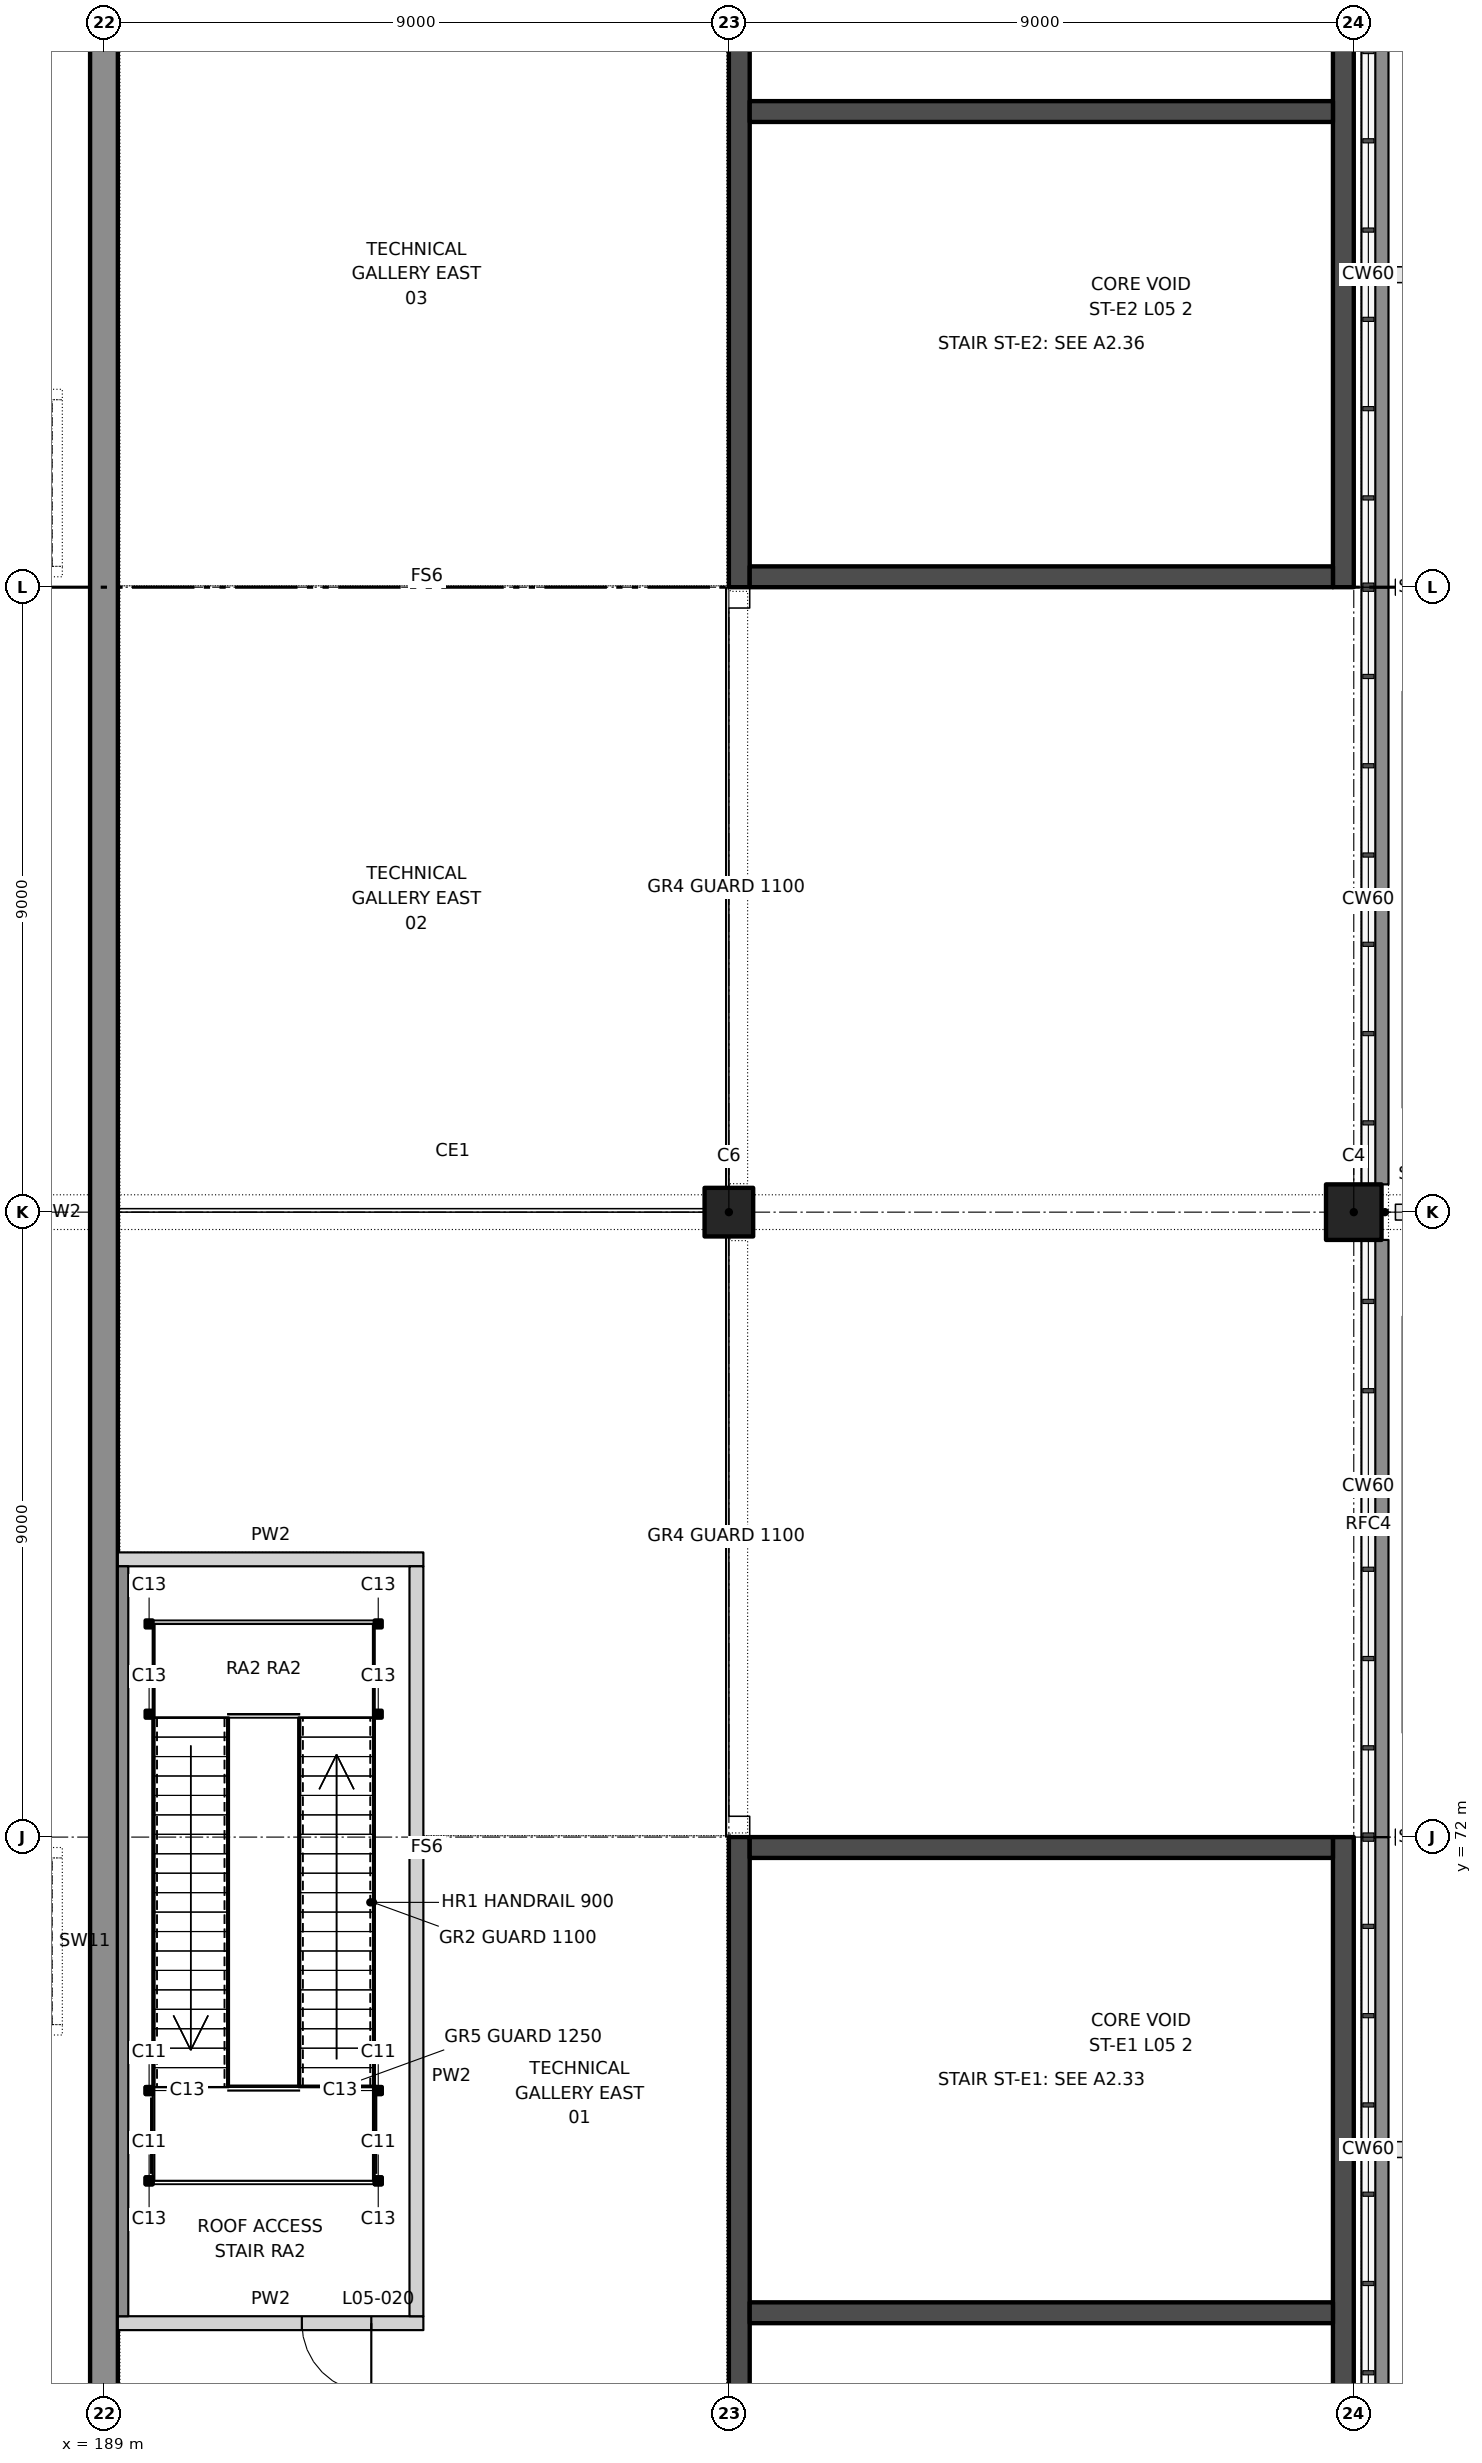
"""IFC4 building model, lengths in metres.
Left out: names, types, materials, properties, quantities, classifications, styles, units other than length and angle.
Written with IfcOpenShell. Run it as: python <this file> out.ifc"""

import sys

from ifc_helpers import new_model, si_unit, direction, frame, frame_2d, origin, origin_2d, place, context, subcontext, project, spatial, rectangle, hollow_rectangle, extrude, element, fill, save


model = new_model("IFC4")
c1 = context("Model", 3, precision=1e-05, world=origin(), true_north=direction((0.0, 1.0)))
c2 = subcontext(c1, "Body", "Model", "MODEL_VIEW")
j1 = project(units=[si_unit("LENGTHUNIT", "METRE"), si_unit("PLANEANGLEUNIT", "RADIAN")], contexts=[c1])
p1 = place(None, origin())
s1 = spatial("IfcSite", under=j1, at=p1, CompositionType="ELEMENT")
p2 = place(p1, origin())
s2 = spatial("IfcBuilding", under=s1, at=p2, CompositionType="ELEMENT")
p3 = place(p2, frame((0.0, 0.0, 33.5)))
s3 = spatial("IfcBuildingStorey", under=s2, at=p3, CompositionType="ELEMENT", Elevation=33.5)
p4 = place(p3, frame((207.0, 81.0, 0.0), z_axis=(0.0, 0.0, 1.0), x_axis=(1.0, 0.0, 0.0)))
e1 = element("IfcColumn", 1, at=p4, inside=s3, PredefinedType="COLUMN", context=c2, shape_type="SweptSolid", body=[
    extrude(rectangle(XDim=0.8, YDim=0.8, at=origin_2d()), origin(), (0.0, 0.0, 1.0), 4.0),
])
p5 = place(p3, frame((198.0, 81.0, 0.0), z_axis=(0.0, 0.0, 1.0), x_axis=(1.0, 0.0, 0.0)))
e2 = element("IfcColumn", 2, at=p5, inside=s3, PredefinedType="COLUMN", context=c2, shape_type="SweptSolid", body=[
    extrude(rectangle(XDim=0.7, YDim=0.7, at=origin_2d()), origin(), (0.0, 0.0, 1.0), 4.0),
])
p6 = place(p3, frame((189.0, 63.0, 0.0), z_axis=(0.0, 0.0, 1.0), x_axis=(0.0, 1.0, 0.0)))
e3 = element("IfcWall", 3, at=p6, inside=s3, PredefinedType="SOLIDWALL", context=c2, shape_type="SweptSolid", body=[
    extrude(rectangle(XDim=36.0, YDim=0.4, at=frame_2d((18.0, 0.0))), origin(), (0.0, 0.0, 1.0), 4.0),
])
p7 = place(p2, frame((0.0, 0.0, 28.0)))
s4 = spatial("IfcBuildingStorey", under=s2, at=p7, CompositionType="ELEMENT", Elevation=28.0)
p8 = place(p7, frame((198.35, 81.0, 0.0), z_axis=(0.0, 0.0, 1.0), x_axis=(1.0, 0.0, 0.0)))
e4 = element("IfcWall", 4, at=p8, inside=s4, PredefinedType="PARTITIONING", context=c2, shape_type="SweptSolid", body=[
    extrude(rectangle(XDim=8.25, YDim=0.15, at=frame_2d((4.125, 0.0))), origin(), (0.0, 0.0, 1.0), 9.5),
])
p9 = place(p3, frame((189.2, 65.0, 0.0), z_axis=(0.0, 0.0, 1.0), x_axis=(1.0, 0.0, 0.0)))
e5 = element("IfcWall", 5, at=p9, inside=s3, PredefinedType="PARTITIONING", context=c2, shape_type="SweptSolid", body=[
    extrude(rectangle(XDim=4.4, YDim=0.2, at=frame_2d((2.2, 0.0))), origin(), (0.0, 0.0, 1.0), 12.85),
])
p10 = place(p9, frame((2.65, 0.0, 0.0)))
e6 = element("IfcOpeningElement", 6, at=p10, cuts=e5, PredefinedType="OPENING", context=c2, shape_type="SweptSolid", body=[
    extrude(rectangle(XDim=1.0, YDim=2.1, at=frame_2d((0.5, 1.05))), frame((0.0, 0.11, 0.0), z_axis=(0.0, -1.0, 0.0), x_axis=(1.0, 0.0, 0.0)), (0.0, 0.0, 1.0), 0.22),
])
p11 = place(p3, frame((189.2, 76.0, 0.0), z_axis=(0.0, 0.0, 1.0), x_axis=(1.0, 0.0, 0.0)))
e7 = element("IfcWall", 7, at=p11, inside=s3, PredefinedType="PARTITIONING", context=c2, shape_type="SweptSolid", body=[
    extrude(rectangle(XDim=4.4, YDim=0.2, at=frame_2d((2.2, 0.0))), origin(), (0.0, 0.0, 1.0), 12.85),
])
p12 = place(p3, frame((193.5, 65.1, 0.0), z_axis=(0.0, 0.0, 1.0), x_axis=(0.0, 1.0, 0.0)))
e8 = element("IfcWall", 8, at=p12, inside=s3, PredefinedType="PARTITIONING", context=c2, shape_type="SweptSolid", body=[
    extrude(rectangle(XDim=6.9, YDim=0.2, at=frame_2d((3.45, 0.0))), origin(), (0.0, 0.0, 1.0), 12.85),
])
p13 = place(p3, frame((193.5, 72.0, 0.0), z_axis=(0.0, 0.0, 1.0), x_axis=(0.0, 1.0, 0.0)))
e9 = element("IfcWall", 9, at=p13, inside=s3, PredefinedType="PARTITIONING", context=c2, shape_type="SweptSolid", body=[
    extrude(rectangle(XDim=3.9, YDim=0.2, at=frame_2d((1.95, 0.0))), origin(), (0.0, 0.0, 1.0), 12.85),
])
p14 = place(p3, frame((207.325, 63.0, 0.0), z_axis=(0.0, 0.0, 1.0), x_axis=(0.0, 1.0, 0.0)))
e10 = element("IfcWall", 10, at=p14, inside=s3, PredefinedType="SOLIDWALL", context=c2, shape_type="SweptSolid", body=[
    extrude(rectangle(XDim=9.0, YDim=0.35, at=frame_2d((4.5, 0.0))), origin(), (0.0, 0.0, 1.0), 4.0),
])
for number, where, z_axis, x_axis in (
    (11, (207.35, 72.0, 0.0), (0.0, 0.0, 1.0), (0.0, 1.0, 0.0)),
    (12, (207.35, 81.4, 0.0), (0.0, 0.0, 1.0), (0.0, 1.0, 0.0)),
):
    element("IfcWall", number, at=place(p3, frame(where, z_axis=z_axis, x_axis=x_axis)), inside=s3, PredefinedType="SOLIDWALL", context=c2, shape_type="SweptSolid", body=[
        extrude(rectangle(XDim=8.6, YDim=0.3, at=frame_2d((4.3, 0.0))), origin(), (0.0, 0.0, 1.0), 4.0),
    ])
p15 = place(p3, frame((207.325, 90.0, 0.0), z_axis=(0.0, 0.0, 1.0), x_axis=(0.0, 1.0, 0.0)))
e13 = element("IfcWall", 13, at=p15, inside=s3, PredefinedType="SOLIDWALL", context=c2, shape_type="SweptSolid", body=[
    extrude(rectangle(XDim=9.0, YDim=0.35, at=frame_2d((4.5, 0.0))), origin(), (0.0, 0.0, 1.0), 4.0),
])
p16 = place(p3, frame((198.15, 54.0, 0.0), z_axis=(0.0, 0.0, 1.0), x_axis=(0.0, 1.0, 0.0)))
e14 = element("IfcWall", 14, at=p16, inside=s3, PredefinedType="SHEAR", context=c2, shape_type="SweptSolid", body=[
    extrude(rectangle(XDim=18.0, YDim=0.3, at=frame_2d((9.0, 0.0))), origin(), (0.0, 0.0, 1.0), 4.0),
])
p17 = place(p16, frame((8.6, 0.0, 0.0)))
e15 = element("IfcOpeningElement", 15, at=p17, cuts=e14, PredefinedType="OPENING", context=c2, shape_type="SweptSolid", body=[
    extrude(rectangle(XDim=1.2, YDim=2.1, at=frame_2d((0.6, 1.05))), frame((0.0, 0.16, 0.0), z_axis=(0.0, -1.0, 0.0), x_axis=(1.0, 0.0, 0.0)), (0.0, 0.0, 1.0), 0.32),
])
p18 = place(p3, frame((206.85, 54.0, 0.0), z_axis=(0.0, 0.0, 1.0), x_axis=(0.0, 1.0, 0.0)))
e16 = element("IfcWall", 16, at=p18, inside=s3, PredefinedType="SHEAR", context=c2, shape_type="SweptSolid", body=[
    extrude(rectangle(XDim=18.0, YDim=0.3, at=frame_2d((9.0, 0.0))), origin(), (0.0, 0.0, 1.0), 4.0),
])
for number, where, z_axis, x_axis in (
    (17, (198.3, 71.85, 0.0), (0.0, 0.0, 1.0), (1.0, 0.0, 0.0)),
    (18, (198.3, 65.15, 0.0), (0.0, 0.0, 1.0), (1.0, 0.0, 0.0)),
):
    element("IfcWall", number, at=place(p3, frame(where, z_axis=z_axis, x_axis=x_axis)), inside=s3, PredefinedType="SHEAR", context=c2, shape_type="SweptSolid", body=[
        extrude(rectangle(XDim=8.4, YDim=0.3, at=frame_2d((4.2, 0.0))), origin(), (0.0, 0.0, 1.0), 4.0),
    ])
p19 = place(p3, frame((198.15, 108.0, 0.0), z_axis=(0.0, 0.0, 1.0), x_axis=(0.0, -1.0, 0.0)))
e19 = element("IfcWall", 19, at=p19, inside=s3, PredefinedType="SHEAR", context=c2, shape_type="SweptSolid", body=[
    extrude(rectangle(XDim=18.0, YDim=0.3, at=frame_2d((9.0, 0.0))), origin(), (0.0, 0.0, 1.0), 4.0),
])
p20 = place(p19, frame((8.6, 0.0, 0.0)))
e20 = element("IfcOpeningElement", 20, at=p20, cuts=e19, PredefinedType="OPENING", context=c2, shape_type="SweptSolid", body=[
    extrude(rectangle(XDim=1.2, YDim=2.1, at=frame_2d((0.6, 1.05))), frame((0.0, 0.16, 0.0), z_axis=(0.0, -1.0, 0.0), x_axis=(1.0, 0.0, 0.0)), (0.0, 0.0, 1.0), 0.32),
])
p21 = place(p3, frame((206.85, 108.0, 0.0), z_axis=(0.0, 0.0, 1.0), x_axis=(0.0, -1.0, 0.0)))
e21 = element("IfcWall", 21, at=p21, inside=s3, PredefinedType="SHEAR", context=c2, shape_type="SweptSolid", body=[
    extrude(rectangle(XDim=18.0, YDim=0.3, at=frame_2d((9.0, 0.0))), origin(), (0.0, 0.0, 1.0), 4.0),
])
for number, where, z_axis, x_axis in (
    (22, (198.3, 90.15, 0.0), (0.0, 0.0, 1.0), (1.0, 0.0, 0.0)),
    (23, (198.3, 96.85, 0.0), (0.0, 0.0, 1.0), (1.0, 0.0, 0.0)),
):
    element("IfcWall", number, at=place(p3, frame(where, z_axis=z_axis, x_axis=x_axis)), inside=s3, PredefinedType="SHEAR", context=c2, shape_type="SweptSolid", body=[
        extrude(rectangle(XDim=8.4, YDim=0.3, at=frame_2d((4.2, 0.0))), origin(), (0.0, 0.0, 1.0), 4.0),
    ])
for number, where, z_axis, x_axis in (
    (24, (192.95, 67.05, -0.3), (0.0, 0.0, 1.0), (1.0, 0.0, 0.0)),
    (25, (189.65, 67.05, -0.3), (0.0, 0.0, 1.0), (1.0, 0.0, 0.0)),
    (26, (192.95, 68.35, -0.3), (0.0, 0.0, 1.0), (1.0, 0.0, 0.0)),
    (27, (189.65, 68.35, -0.3), (0.0, 0.0, 1.0), (1.0, 0.0, 0.0)),
):
    element("IfcColumn", number, at=place(p3, frame(where, z_axis=z_axis, x_axis=x_axis)), inside=s3, PredefinedType="COLUMN", context=c2, shape_type="SweptSolid", body=[
        extrude(hollow_rectangle(XDim=0.1, YDim=0.1, WallThickness=0.008, at=origin_2d()), origin(), (0.0, 0.0, 1.0), 13.62),
    ])
for number, where, z_axis, x_axis in (
    (28, (192.95, 73.77, -0.3), (0.0, 0.0, 1.0), (1.0, 0.0, 0.0)),
    (29, (189.65, 73.77, -0.3), (0.0, 0.0, 1.0), (1.0, 0.0, 0.0)),
    (30, (192.95, 75.07, -0.3), (0.0, 0.0, 1.0), (1.0, 0.0, 0.0)),
    (31, (189.65, 75.07, -0.3), (0.0, 0.0, 1.0), (1.0, 0.0, 0.0)),
):
    element("IfcColumn", number, at=place(p3, frame(where, z_axis=z_axis, x_axis=x_axis)), inside=s3, PredefinedType="COLUMN", context=c2, shape_type="SweptSolid", body=[
        extrude(hollow_rectangle(XDim=0.1, YDim=0.1, WallThickness=0.008, at=origin_2d()), origin(), (0.0, 0.0, 1.0), 10.42),
    ])
p22 = place(p3, frame((189.275, 65.1, 0.0), z_axis=(0.0, 0.0, 1.0), x_axis=(0.0, 1.0, 0.0)))
e32 = element("IfcWall", 32, at=p22, inside=s3, PredefinedType="SOLIDWALL", context=c2, shape_type="SweptSolid", body=[
    extrude(rectangle(XDim=10.8, YDim=0.15, at=frame_2d((5.4, 0.0))), origin(), (0.0, 0.0, 1.0), 12.85),
])
p23 = place(p10, frame((1.0, 0.0, 0.0), z_axis=(0.0, 0.0, 1.0), x_axis=(-1.0, 0.0, 0.0)))
e33 = element("IfcDoor", 33, at=p23, inside=s3, OperationType="SINGLE_SWING_LEFT", PredefinedType="DOOR", context=c2, shape_type="SweptSolid", body=[
    extrude(rectangle(XDim=1.0, YDim=2.1, at=frame_2d((0.5, 1.05))), frame((0.0, 0.025, 0.0), z_axis=(0.0, -1.0, 0.0), x_axis=(1.0, 0.0, 0.0)), (0.0, 0.0, 1.0), 0.05),
])
fill(e6, e33)
save(model, sys.argv[1])
